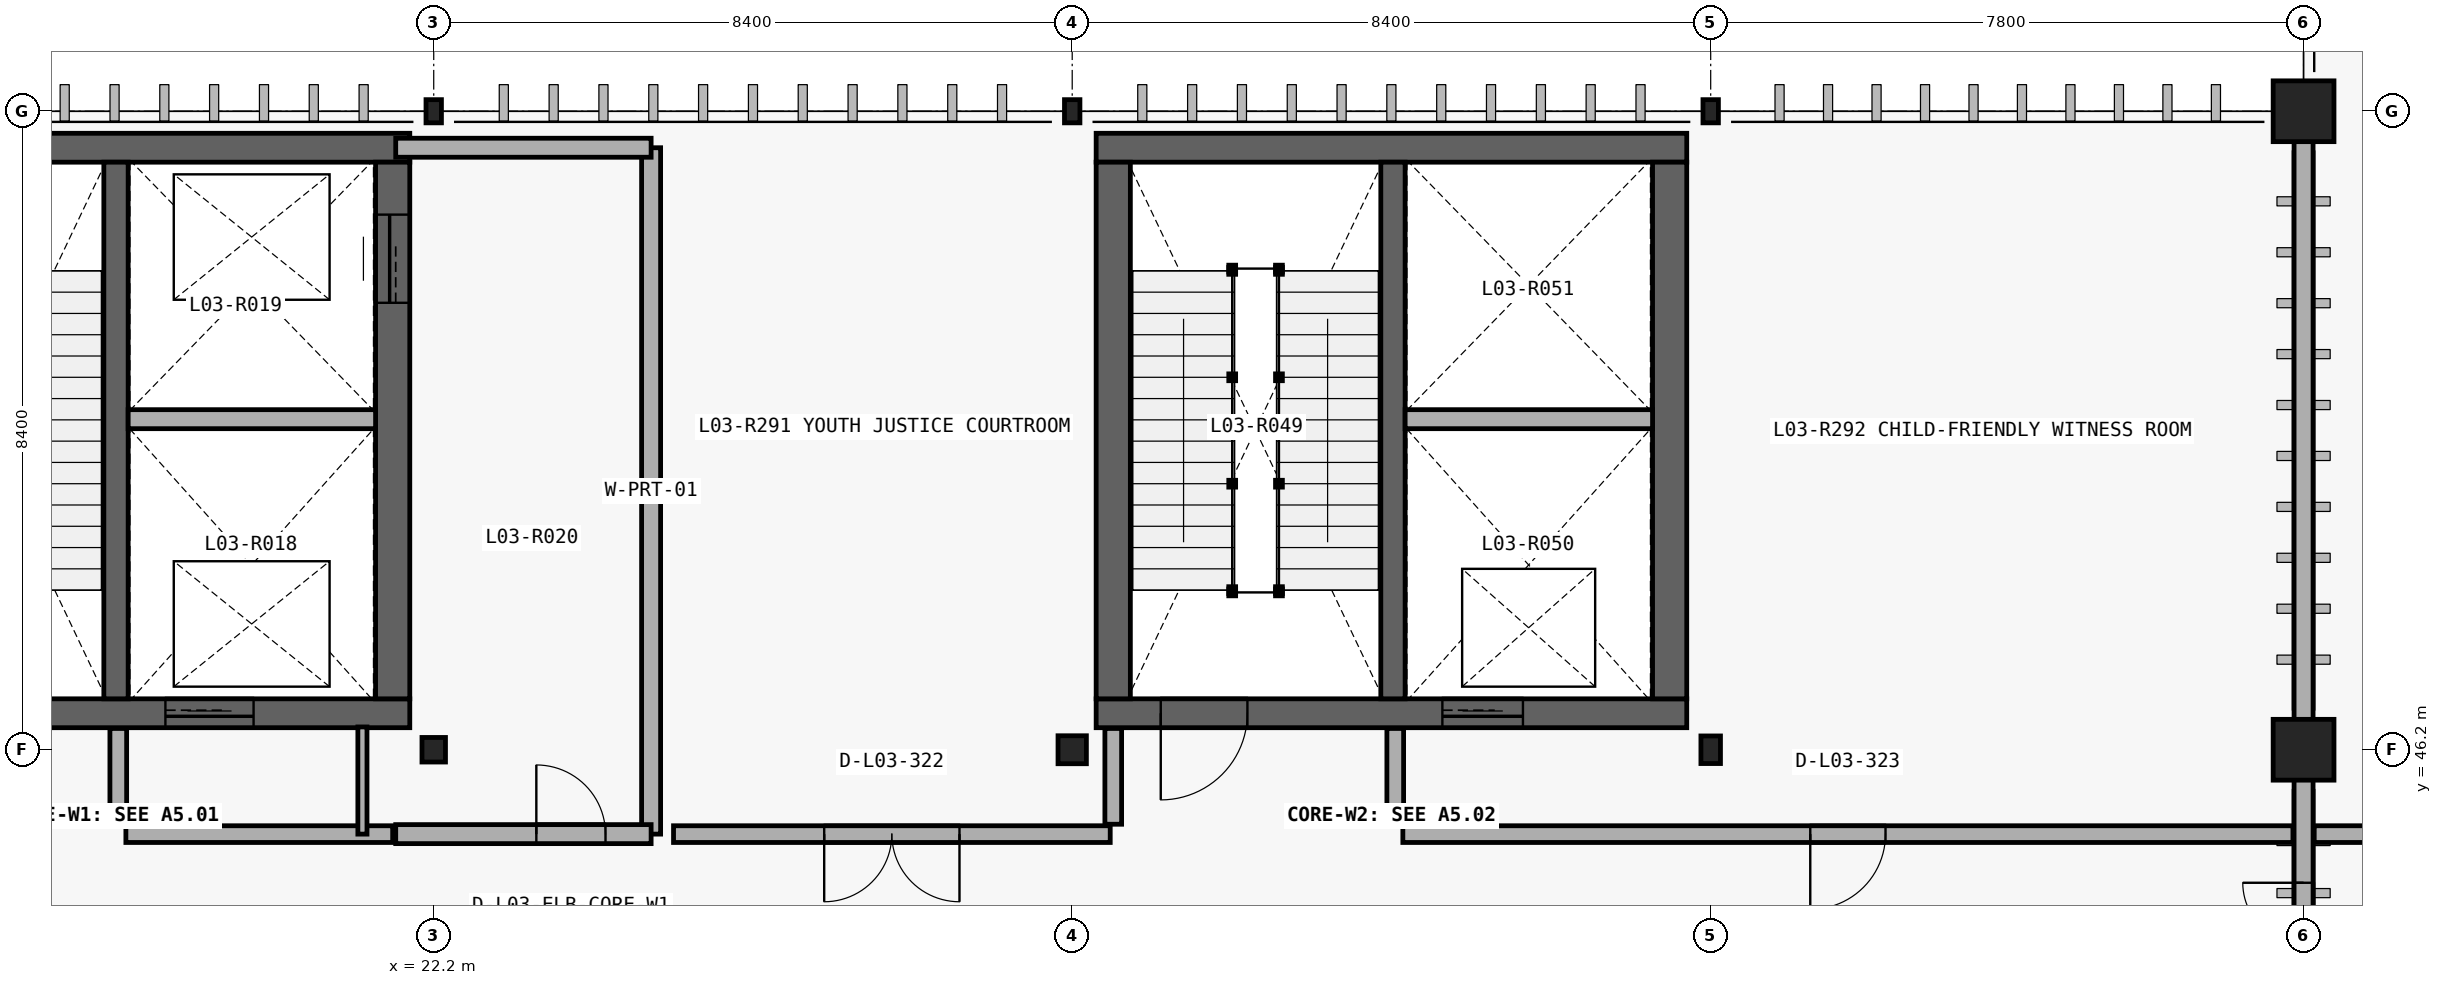
"""IFC4 building model, lengths in metres.
Left out: names, types, materials, properties, quantities, classifications, styles, units other than length and angle.
Written with IfcOpenShell. Run it as: python <this file> out.ifc"""

import sys

from ifc_helpers import new_model, si_unit, direction, frame, frame_2d, origin_with_axes, origin_2d_with_axis, place, context, subcontext, project, spatial, rectangle, hollow_rectangle, circle, i_section, extrude, element, fill, save


model = new_model("IFC4")
c1 = context("Model", 3, precision=1e-05, world=origin_with_axes(), true_north=direction((0.0, 1.0)))
c2 = subcontext(c1, "Body", "Model", "MODEL_VIEW")
j1 = project(units=[si_unit("LENGTHUNIT", "METRE"), si_unit("PLANEANGLEUNIT", "RADIAN")], contexts=[c1])
p1 = place(None, origin_with_axes())
s1 = spatial("IfcSite", under=j1, at=p1, CompositionType="ELEMENT")
p2 = place(p1, origin_with_axes())
s2 = spatial("IfcBuilding", under=s1, at=p2, CompositionType="ELEMENT")
p3 = place(p2, frame((0.0, 0.0, 15.6), z_axis=(0.0, 0.0, 1.0), x_axis=(1.0, 0.0, 0.0)))
s3 = spatial("IfcBuildingStorey", under=s2, at=p3, CompositionType="ELEMENT", Elevation=15.6)
p4 = place(None, frame((14.115, 46.68, 15.6), z_axis=(0.0, 0.0, 1.0), x_axis=(1.0, 0.0, 0.0)))
e1 = element("IfcWall", 1, at=p4, inside=s3, PredefinedType="SHEAR", context=c2, shape_type="SweptSolid", body=[
    extrude(rectangle(XDim=7.77, YDim=0.38, at=frame_2d((3.885, 0.0), x_axis=(1.0, 0.0))), origin_with_axes(), (0.0, 0.0, 1.0), 4.8),
])
p5 = place(None, frame((15.535, 46.68, 15.6), z_axis=(0.0, 0.0, 1.0), x_axis=(1.0, 0.0, 0.0)))
e2 = element("IfcOpeningElement", 2, at=p5, cuts=e1, PredefinedType="OPENING", context=c2, shape_type="SweptSolid", body=[
    extrude(rectangle(XDim=1.14, YDim=2.18, at=frame_2d((0.0, 1.09), x_axis=(1.0, 0.0))), frame((0.0, 0.2, 0.0), z_axis=(0.0, -1.0, 0.0), x_axis=(1.0, 0.0, 0.0)), (0.0, 0.0, 1.0), 0.4),
])
p6 = place(None, frame((19.25, 46.68, 15.6), z_axis=(0.0, 0.0, 1.0), x_axis=(1.0, 0.0, 0.0)))
e3 = element("IfcOpeningElement", 3, at=p6, cuts=e1, PredefinedType="OPENING", context=c2, shape_type="SweptSolid", body=[
    extrude(rectangle(XDim=1.16, YDim=2.2, at=frame_2d((0.0, 1.1), x_axis=(1.0, 0.0))), frame((0.0, 0.2, 0.0), z_axis=(0.0, -1.0, 0.0), x_axis=(1.0, 0.0, 0.0)), (0.0, 0.0, 1.0), 0.4),
])
p7 = place(None, frame((21.885, 54.12, 15.6), z_axis=(0.0, 0.0, 1.0), x_axis=(-1.0, 0.0, 0.0)))
e4 = element("IfcWall", 4, at=p7, inside=s3, PredefinedType="SHEAR", context=c2, shape_type="SweptSolid", body=[
    extrude(rectangle(XDim=7.77, YDim=0.38, at=frame_2d((3.885, 0.0), x_axis=(1.0, 0.0))), origin_with_axes(), (0.0, 0.0, 1.0), 4.8),
])
p8 = place(None, frame((21.66, 46.87, 15.6), z_axis=(0.0, 0.0, 1.0), x_axis=(0.0, 1.0, 0.0)))
e5 = element("IfcWall", 5, at=p8, inside=s3, PredefinedType="SHEAR", context=c2, shape_type="SweptSolid", body=[
    extrude(rectangle(XDim=7.06, YDim=0.45, at=frame_2d((3.53, 0.0), x_axis=(1.0, 0.0))), origin_with_axes(), (0.0, 0.0, 1.0), 4.8),
])
p9 = place(None, frame((21.66, 52.66, 15.6), z_axis=(0.0, 0.0, 1.0), x_axis=(0.0, 1.0, 0.0)))
e6 = element("IfcOpeningElement", 6, at=p9, cuts=e5, PredefinedType="OPENING", context=c2, shape_type="SweptSolid", body=[
    extrude(rectangle(XDim=1.16, YDim=2.2, at=frame_2d((0.0, 1.1), x_axis=(1.0, 0.0))), frame((0.0, 0.235, 0.0), z_axis=(0.0, -1.0, 0.0), x_axis=(1.0, 0.0, 0.0)), (0.0, 0.0, 1.0), 0.47),
])
p10 = place(None, frame((18.02, 46.87, 15.6), z_axis=(0.0, 0.0, 1.0), x_axis=(0.0, 1.0, 0.0)))
e7 = element("IfcWall", 7, at=p10, inside=s3, PredefinedType="SHEAR", context=c2, shape_type="SweptSolid", body=[
    extrude(rectangle(XDim=7.06, YDim=0.32, at=frame_2d((3.53, 0.0), x_axis=(1.0, 0.0))), origin_with_axes(), (0.0, 0.0, 1.0), 4.8),
])
p11 = place(None, frame((18.18, 50.549, 15.6), z_axis=(0.0, 0.0, 1.0), x_axis=(1.0, 0.0, 0.0)))
e8 = element("IfcWall", 8, at=p11, inside=s3, PredefinedType="PARTITIONING", context=c2, shape_type="SweptSolid", body=[
    extrude(rectangle(XDim=3.255, YDim=0.25, at=frame_2d((1.627, 0.0), x_axis=(1.0, 0.0))), origin_with_axes(), (0.0, 0.0, 1.0), 4.48),
])
p12 = place(None, frame((25.06, 45.09, 15.6), z_axis=(0.0, 0.0, 1.0), x_axis=(0.0, 1.0, 0.0)))
e9 = element("IfcWall", 9, at=p12, inside=s3, PredefinedType="PARTITIONING", context=c2, shape_type="SweptSolid", body=[
    extrude(rectangle(XDim=9.03, YDim=0.25, at=frame_2d((4.515, 0.0), x_axis=(1.0, 0.0))), origin_with_axes(), (0.0, 0.0, 1.0), 4.48),
])
p13 = place(None, frame((21.7, 54.12, 15.6), z_axis=(0.0, 0.0, 1.0), x_axis=(1.0, 0.0, 0.0)))
e10 = element("IfcWall", 10, at=p13, inside=s3, PredefinedType="PARTITIONING", context=c2, shape_type="SweptSolid", body=[
    extrude(rectangle(XDim=3.36, YDim=0.25, at=frame_2d((1.68, 0.0), x_axis=(1.0, 0.0))), origin_with_axes(), (0.0, 0.0, 1.0), 4.48),
])
p14 = place(None, frame((21.7, 45.09, 15.6), z_axis=(0.0, 0.0, 1.0), x_axis=(1.0, 0.0, 0.0)))
e11 = element("IfcWall", 11, at=p14, inside=s3, PredefinedType="PARTITIONING", context=c2, shape_type="SweptSolid", body=[
    extrude(rectangle(XDim=3.36, YDim=0.25, at=frame_2d((1.68, 0.0), x_axis=(1.0, 0.0))), origin_with_axes(), (0.0, 0.0, 1.0), 4.48),
])
p15 = place(None, frame((24.005, 45.09, 15.6), z_axis=(0.0, 0.0, 1.0), x_axis=(1.0, 0.0, 0.0)))
e12 = element("IfcOpeningElement", 12, at=p15, cuts=e11, PredefinedType="OPENING", context=c2, shape_type="SweptSolid", body=[
    extrude(rectangle(XDim=0.91, YDim=2.12, at=frame_2d((0.0, 1.06), x_axis=(1.0, 0.0))), frame((0.0, 0.135, 0.0), z_axis=(0.0, -1.0, 0.0), x_axis=(1.0, 0.0, 0.0)), (0.0, 0.0, 1.0), 0.27),
])
p16 = place(None, frame((30.915, 46.68, 15.6), z_axis=(0.0, 0.0, 1.0), x_axis=(1.0, 0.0, 0.0)))
e13 = element("IfcWall", 13, at=p16, inside=s3, PredefinedType="SHEAR", context=c2, shape_type="SweptSolid", body=[
    extrude(rectangle(XDim=7.77, YDim=0.38, at=frame_2d((3.885, 0.0), x_axis=(1.0, 0.0))), origin_with_axes(), (0.0, 0.0, 1.0), 4.8),
])
p17 = place(None, frame((32.335, 46.68, 15.6), z_axis=(0.0, 0.0, 1.0), x_axis=(1.0, 0.0, 0.0)))
e14 = element("IfcOpeningElement", 14, at=p17, cuts=e13, PredefinedType="OPENING", context=c2, shape_type="SweptSolid", body=[
    extrude(rectangle(XDim=1.14, YDim=2.18, at=frame_2d((0.0, 1.09), x_axis=(1.0, 0.0))), frame((0.0, 0.2, 0.0), z_axis=(0.0, -1.0, 0.0), x_axis=(1.0, 0.0, 0.0)), (0.0, 0.0, 1.0), 0.4),
])
p18 = place(None, frame((36.0, 46.68, 15.6), z_axis=(0.0, 0.0, 1.0), x_axis=(1.0, 0.0, 0.0)))
e15 = element("IfcOpeningElement", 15, at=p18, cuts=e13, PredefinedType="OPENING", context=c2, shape_type="SweptSolid", body=[
    extrude(rectangle(XDim=1.06, YDim=2.16, at=frame_2d((0.0, 1.08), x_axis=(1.0, 0.0))), frame((0.0, 0.2, 0.0), z_axis=(0.0, -1.0, 0.0), x_axis=(1.0, 0.0, 0.0)), (0.0, 0.0, 1.0), 0.4),
])
p19 = place(None, frame((38.685, 54.12, 15.6), z_axis=(0.0, 0.0, 1.0), x_axis=(-1.0, 0.0, 0.0)))
e16 = element("IfcWall", 16, at=p19, inside=s3, PredefinedType="SHEAR", context=c2, shape_type="SweptSolid", body=[
    extrude(rectangle(XDim=7.77, YDim=0.38, at=frame_2d((3.885, 0.0), x_axis=(1.0, 0.0))), origin_with_axes(), (0.0, 0.0, 1.0), 4.8),
])
for number, where, z_axis, x_axis in (
    (17, (38.46, 46.87, 15.6), (0.0, 0.0, 1.0), (0.0, 1.0, 0.0)),
    (18, (31.14, 53.93, 15.6), (0.0, 0.0, 1.0), (0.0, -1.0, 0.0)),
):
    element("IfcWall", number, at=place(None, frame(where, z_axis=z_axis, x_axis=x_axis)), inside=s3, PredefinedType="SHEAR", context=c2, shape_type="SweptSolid", body=[
        extrude(rectangle(XDim=7.06, YDim=0.45, at=frame_2d((3.53, 0.0), x_axis=(1.0, 0.0))), origin_with_axes(), (0.0, 0.0, 1.0), 4.8),
    ])
p20 = place(None, frame((34.82, 46.87, 15.6), z_axis=(0.0, 0.0, 1.0), x_axis=(0.0, 1.0, 0.0)))
e19 = element("IfcWall", 19, at=p20, inside=s3, PredefinedType="SHEAR", context=c2, shape_type="SweptSolid", body=[
    extrude(rectangle(XDim=7.06, YDim=0.32, at=frame_2d((3.53, 0.0), x_axis=(1.0, 0.0))), origin_with_axes(), (0.0, 0.0, 1.0), 4.8),
])
p21 = place(None, frame((34.98, 50.549, 15.6), z_axis=(0.0, 0.0, 1.0), x_axis=(1.0, 0.0, 0.0)))
e20 = element("IfcWall", 20, at=p21, inside=s3, PredefinedType="PARTITIONING", context=c2, shape_type="SweptSolid", body=[
    extrude(rectangle(XDim=3.255, YDim=0.25, at=frame_2d((1.627, 0.0), x_axis=(1.0, 0.0))), origin_with_axes(), (0.0, 0.0, 1.0), 4.48),
])
p22 = place(None, frame((46.8, 39.05, 15.6), z_axis=(0.0, 0.0, 1.0), x_axis=(0.0, 1.0, 0.0)))
e21 = element("IfcWall", 21, at=p22, inside=s3, PredefinedType="PARTITIONING", context=c2, shape_type="SweptSolid", body=[
    extrude(rectangle(XDim=15.5, YDim=0.25, at=frame_2d((7.75, 0.0), x_axis=(1.0, 0.0))), origin_with_axes(), (0.0, 0.0, 1.0), 4.084),
])
p23 = place(None, frame((46.8, 43.65, 15.6), z_axis=(0.0, 0.0, 1.0), x_axis=(0.0, 1.0, 0.0)))
e22 = element("IfcOpeningElement", 22, at=p23, cuts=e21, PredefinedType="OPENING", context=c2, shape_type="SweptSolid", body=[
    extrude(rectangle(XDim=1.6, YDim=2.32, at=frame_2d((0.0, 1.16), x_axis=(1.0, 0.0))), frame((0.0, 0.135, 0.0), z_axis=(0.0, -1.0, 0.0), x_axis=(1.0, 0.0, 0.0)), (0.0, 0.0, 1.0), 0.27),
])
for number, where, z_axis, x_axis in (
    (23, (18.05, 45.22, 15.6), (0.0, 0.0, 1.0), (0.0, 1.0, 0.0)),
    (24, (31.14, 45.22, 15.6), (0.0, 0.0, 1.0), (0.0, 1.0, 0.0)),
    (25, (34.85, 45.22, 15.6), (0.0, 0.0, 1.0), (0.0, 1.0, 0.0)),
):
    element("IfcWall", number, at=place(None, frame(where, z_axis=z_axis, x_axis=x_axis)), inside=s3, PredefinedType="PARTITIONING", context=c2, shape_type="SweptSolid", body=[
        extrude(rectangle(XDim=1.26, YDim=0.22, at=frame_2d((0.63, 0.0), x_axis=(1.0, 0.0))), origin_with_axes(), (0.0, 0.0, 1.0), 4.48),
    ])
p24 = place(None, frame((18.15, 45.09, 15.6), z_axis=(0.0, 0.0, 1.0), x_axis=(1.0, 0.0, 0.0)))
e26 = element("IfcWall", 26, at=p24, inside=s3, PredefinedType="PARTITIONING", context=c2, shape_type="SweptSolid", body=[
    extrude(rectangle(XDim=3.51, YDim=0.22, at=frame_2d((1.755, 0.0), x_axis=(1.0, 0.0))), origin_with_axes(), (0.0, 0.0, 1.0), 4.48),
])
p25 = place(None, frame((25.355, 45.09, 15.6), z_axis=(0.0, 0.0, 1.0), x_axis=(1.0, 0.0, 0.0)))
e27 = element("IfcWall", 27, at=p25, inside=s3, PredefinedType="PARTITIONING", context=c2, shape_type="SweptSolid", body=[
    extrude(rectangle(XDim=5.745, YDim=0.22, at=frame_2d((2.873, 0.0), x_axis=(1.0, 0.0))), origin_with_axes(), (0.0, 0.0, 1.0), 4.48),
])
p26 = place(None, frame((28.227, 45.09, 15.6), z_axis=(0.0, 0.0, 1.0), x_axis=(1.0, 0.0, 0.0)))
e28 = element("IfcOpeningElement", 28, at=p26, cuts=e27, PredefinedType="OPENING", context=c2, shape_type="SweptSolid", body=[
    extrude(rectangle(XDim=1.78, YDim=2.48, at=frame_2d((0.0, 1.24), x_axis=(1.0, 0.0))), frame((0.0, 0.12, 0.0), z_axis=(0.0, -1.0, 0.0), x_axis=(1.0, 0.0, 0.0)), (0.0, 0.0, 1.0), 0.24),
])
p27 = place(None, frame((34.95, 45.09, 15.6), z_axis=(0.0, 0.0, 1.0), x_axis=(1.0, 0.0, 0.0)))
e29 = element("IfcWall", 29, at=p27, inside=s3, PredefinedType="PARTITIONING", context=c2, shape_type="SweptSolid", body=[
    extrude(rectangle(XDim=11.71, YDim=0.22, at=frame_2d((5.855, 0.0), x_axis=(1.0, 0.0))), origin_with_axes(), (0.0, 0.0, 1.0), 4.48),
])
p28 = place(None, frame((40.805, 45.09, 15.6), z_axis=(0.0, 0.0, 1.0), x_axis=(1.0, 0.0, 0.0)))
e30 = element("IfcOpeningElement", 30, at=p28, cuts=e29, PredefinedType="OPENING", context=c2, shape_type="SweptSolid", body=[
    extrude(rectangle(XDim=0.99, YDim=2.22, at=frame_2d((0.0, 1.11), x_axis=(1.0, 0.0))), frame((0.0, 0.12, 0.0), z_axis=(0.0, -1.0, 0.0), x_axis=(1.0, 0.0, 0.0)), (0.0, 0.0, 1.0), 0.24),
])
p29 = place(None, frame((21.262, 45.09, 15.6), z_axis=(0.0, 0.0, 1.0), x_axis=(0.0, 1.0, 0.0)))
e31 = element("IfcWall", 31, at=p29, inside=s3, PredefinedType="PARTITIONING", context=c2, shape_type="SweptSolid", body=[
    extrude(rectangle(XDim=1.41, YDim=0.12, at=frame_2d((0.705, 0.0), x_axis=(1.0, 0.0))), origin_with_axes(), (0.0, 0.0, 1.0), 4.48),
])
p30 = place(None, frame((46.94, 45.09, 15.6), z_axis=(0.0, 0.0, 1.0), x_axis=(1.0, 0.0, 0.0)))
e32 = element("IfcWall", 32, at=p30, inside=s3, PredefinedType="PARTITIONING", context=c2, shape_type="SweptSolid", body=[
    extrude(rectangle(XDim=8.76, YDim=0.22, at=frame_2d((4.38, 0.0), x_axis=(1.0, 0.0))), origin_with_axes(), (0.0, 0.0, 1.0), 4.48),
])
p31 = place(None, frame((51.32, 45.09, 15.6), z_axis=(0.0, 0.0, 1.0), x_axis=(1.0, 0.0, 0.0)))
e33 = element("IfcOpeningElement", 33, at=p31, cuts=e32, PredefinedType="OPENING", context=c2, shape_type="SweptSolid", body=[
    extrude(rectangle(XDim=0.92, YDim=2.14, at=frame_2d((0.0, 1.07), x_axis=(1.0, 0.0))), frame((0.0, 0.12, 0.0), z_axis=(0.0, -1.0, 0.0), x_axis=(1.0, 0.0, 0.0)), (0.0, 0.0, 1.0), 0.24),
])
p32 = place(None, frame((22.2, 46.2, 15.6), z_axis=(0.0, 0.0, 1.0), x_axis=(1.0, 0.0, 0.0)))
e34 = element("IfcColumn", 34, at=p32, inside=s3, PredefinedType="COLUMN", context=c2, shape_type="SweptSolid", body=[
    extrude(i_section(OverallWidth=0.309, OverallDepth=0.323, WebThickness=0.014, FlangeThickness=0.023, at=origin_2d_with_axis()), origin_with_axes(), (0.0, 0.0, 1.0), 4.8),
])
p33 = place(None, frame((22.2, 54.6, 15.6), z_axis=(0.0, 0.0, 1.0), x_axis=(1.0, 0.0, 0.0)))
e35 = element("IfcColumn", 35, at=p33, inside=s3, PredefinedType="COLUMN", context=c2, shape_type="SweptSolid", body=[
    extrude(hollow_rectangle(XDim=0.203, YDim=0.305, WallThickness=0.013, InnerFilletRadius=0.025, OuterFilletRadius=0.013, at=origin_2d_with_axis()), origin_with_axes(), (0.0, 0.0, 1.0), 4.8),
])
p34 = place(None, frame((30.6, 46.2, 15.6), z_axis=(0.0, 0.0, 1.0), x_axis=(1.0, 0.0, 0.0)))
e36 = element("IfcColumn", 36, at=p34, inside=s3, PredefinedType="COLUMN", context=c2, shape_type="SweptSolid", body=[
    extrude(i_section(OverallWidth=0.373, OverallDepth=0.368, WebThickness=0.015, FlangeThickness=0.024, at=origin_2d_with_axis()), origin_with_axes(), (0.0, 0.0, 1.0), 4.8),
])
p35 = place(None, frame((30.6, 54.6, 15.6), z_axis=(0.0, 0.0, 1.0), x_axis=(1.0, 0.0, 0.0)))
e37 = element("IfcColumn", 37, at=p35, inside=s3, PredefinedType="COLUMN", context=c2, shape_type="SweptSolid", body=[
    extrude(hollow_rectangle(XDim=0.203, YDim=0.305, WallThickness=0.013, InnerFilletRadius=0.025, OuterFilletRadius=0.013, at=origin_2d_with_axis()), origin_with_axes(), (0.0, 0.0, 1.0), 4.8),
])
p36 = place(None, frame((39.0, 46.2, 15.6), z_axis=(0.0, 0.0, 1.0), x_axis=(1.0, 0.0, 0.0)))
e38 = element("IfcColumn", 38, at=p36, inside=s3, PredefinedType="COLUMN", context=c2, shape_type="SweptSolid", body=[
    extrude(i_section(OverallWidth=0.257, OverallDepth=0.363, WebThickness=0.013, FlangeThickness=0.022, at=origin_2d_with_axis()), origin_with_axes(), (0.0, 0.0, 1.0), 4.8),
])
p37 = place(None, frame((39.0, 54.6, 15.6), z_axis=(0.0, 0.0, 1.0), x_axis=(1.0, 0.0, 0.0)))
e39 = element("IfcColumn", 39, at=p37, inside=s3, PredefinedType="COLUMN", context=c2, shape_type="SweptSolid", body=[
    extrude(hollow_rectangle(XDim=0.203, YDim=0.305, WallThickness=0.013, InnerFilletRadius=0.025, OuterFilletRadius=0.013, at=origin_2d_with_axis()), origin_with_axes(), (0.0, 0.0, 1.0), 4.8),
])
for number, where, z_axis, x_axis in (
    (40, (46.8, 46.2, 15.6), (0.0, 0.0, 1.0), (1.0, 0.0, 0.0)),
    (41, (46.8, 54.6, 15.6), (0.0, 0.0, 1.0), (1.0, 0.0, 0.0)),
):
    element("IfcColumn", number, at=place(None, frame(where, z_axis=z_axis, x_axis=x_axis)), inside=s3, PredefinedType="COLUMN", context=c2, shape_type="SweptSolid", body=[
        extrude(circle(Radius=0.4, at=origin_2d_with_axis()), origin_with_axes(), (0.0, 0.0, 1.0), 4.8),
    ])
p38 = place(None, frame((19.25, 46.68, 15.6), z_axis=(0.0, 0.0, 1.0), x_axis=(-1.0, 0.0, 0.0)))
e42 = element("IfcDoor", 42, at=p38, inside=s3, OperationType="SLIDING_TO_LEFT", PredefinedType="DOOR", context=c2, shape_type="SweptSolid", body=[
    extrude(rectangle(XDim=1.16, YDim=2.2, at=frame_2d((0.0, 1.1), x_axis=(1.0, 0.0))), frame((0.0, 0.04, 0.0), z_axis=(0.0, -1.0, 0.0), x_axis=(1.0, 0.0, 0.0)), (0.0, 0.0, 1.0), 0.08),
])
fill(e3, e42)
p39 = place(None, frame((21.66, 52.66, 15.6), z_axis=(0.0, 0.0, 1.0), x_axis=(0.0, 1.0, 0.0)))
e43 = element("IfcDoor", 43, at=p39, inside=s3, OperationType="SLIDING_TO_LEFT", PredefinedType="DOOR", context=c2, shape_type="SweptSolid", body=[
    extrude(rectangle(XDim=1.16, YDim=2.2, at=frame_2d((0.0, 1.1), x_axis=(1.0, 0.0))), frame((0.0, 0.04, 0.0), z_axis=(0.0, -1.0, 0.0), x_axis=(1.0, 0.0, 0.0)), (0.0, 0.0, 1.0), 0.08),
])
fill(e6, e43)
p40 = place(None, frame((24.005, 45.09, 15.6), z_axis=(0.0, 0.0, 1.0), x_axis=(1.0, 0.0, 0.0)))
e44 = element("IfcDoor", 44, at=p40, inside=s3, OperationType="SINGLE_SWING_LEFT", PredefinedType="DOOR", context=c2, shape_type="SweptSolid", body=[
    extrude(rectangle(XDim=0.91, YDim=2.12, at=frame_2d((0.0, 1.06), x_axis=(1.0, 0.0))), frame((0.0, 0.04, 0.0), z_axis=(0.0, -1.0, 0.0), x_axis=(1.0, 0.0, 0.0)), (0.0, 0.0, 1.0), 0.08),
])
fill(e12, e44)
p41 = place(None, frame((32.335, 46.68, 15.6), z_axis=(0.0, 0.0, 1.0), x_axis=(-1.0, 0.0, 0.0)))
e45 = element("IfcDoor", 45, at=p41, inside=s3, OperationType="SINGLE_SWING_LEFT", PredefinedType="DOOR", context=c2, shape_type="SweptSolid", body=[
    extrude(rectangle(XDim=1.14, YDim=2.18, at=frame_2d((0.0, 1.09), x_axis=(1.0, 0.0))), frame((0.0, 0.04, 0.0), z_axis=(0.0, -1.0, 0.0), x_axis=(1.0, 0.0, 0.0)), (0.0, 0.0, 1.0), 0.08),
])
fill(e14, e45)
p42 = place(None, frame((36.0, 46.68, 15.6), z_axis=(0.0, 0.0, 1.0), x_axis=(-1.0, 0.0, 0.0)))
e46 = element("IfcDoor", 46, at=p42, inside=s3, OperationType="SLIDING_TO_LEFT", PredefinedType="DOOR", context=c2, shape_type="SweptSolid", body=[
    extrude(rectangle(XDim=1.06, YDim=2.16, at=frame_2d((0.0, 1.08), x_axis=(1.0, 0.0))), frame((0.0, 0.04, 0.0), z_axis=(0.0, -1.0, 0.0), x_axis=(1.0, 0.0, 0.0)), (0.0, 0.0, 1.0), 0.08),
])
fill(e15, e46)
p43 = place(None, frame((46.8, 43.65, 15.6), z_axis=(0.0, 0.0, 1.0), x_axis=(0.0, 1.0, 0.0)))
e47 = element("IfcDoor", 47, at=p43, inside=s3, OperationType="DOUBLE_DOOR_SINGLE_SWING", PredefinedType="DOOR", context=c2, shape_type="SweptSolid", body=[
    extrude(rectangle(XDim=1.6, YDim=2.32, at=frame_2d((0.0, 1.16), x_axis=(1.0, 0.0))), frame((0.0, 0.04, 0.0), z_axis=(0.0, -1.0, 0.0), x_axis=(1.0, 0.0, 0.0)), (0.0, 0.0, 1.0), 0.08),
])
fill(e22, e47)
p44 = place(None, frame((28.227, 45.09, 15.6), z_axis=(0.0, 0.0, 1.0), x_axis=(-1.0, 0.0, 0.0)))
e48 = element("IfcDoor", 48, at=p44, inside=s3, OperationType="DOUBLE_DOOR_SINGLE_SWING", PredefinedType="DOOR", context=c2, shape_type="SweptSolid", body=[
    extrude(rectangle(XDim=1.78, YDim=2.48, at=frame_2d((0.0, 1.24), x_axis=(1.0, 0.0))), frame((0.0, 0.04, 0.0), z_axis=(0.0, -1.0, 0.0), x_axis=(1.0, 0.0, 0.0)), (0.0, 0.0, 1.0), 0.08),
])
fill(e28, e48)
p45 = place(None, frame((40.805, 45.09, 15.6), z_axis=(0.0, 0.0, 1.0), x_axis=(-1.0, 0.0, 0.0)))
e49 = element("IfcDoor", 49, at=p45, inside=s3, OperationType="SINGLE_SWING_LEFT", PredefinedType="DOOR", context=c2, shape_type="SweptSolid", body=[
    extrude(rectangle(XDim=0.99, YDim=2.22, at=frame_2d((0.0, 1.11), x_axis=(1.0, 0.0))), frame((0.0, 0.04, 0.0), z_axis=(0.0, -1.0, 0.0), x_axis=(1.0, 0.0, 0.0)), (0.0, 0.0, 1.0), 0.08),
])
fill(e30, e49)
save(model, sys.argv[1])
